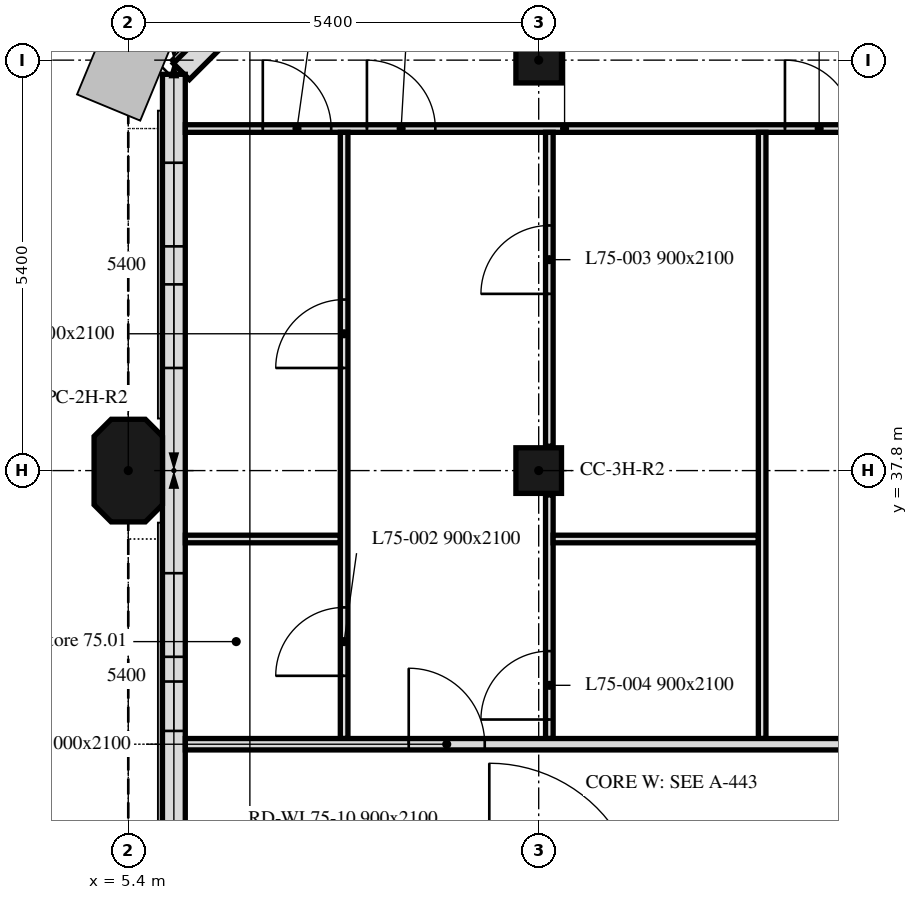
"""IFC4 building model, lengths in metres.
Left out: names, types, materials, properties, quantities, classifications, styles, units other than length and angle.
Written with IfcOpenShell. Run it as: python <this file> out.ifc"""

import sys

from ifc_helpers import new_model, si_unit, direction, frame, frame_2d, origin, origin_2d, place, context, subcontext, project, spatial, polyline, rectangle, outline, extrude, element, fill, save


model = new_model("IFC4")
c1 = context("Model", 3, precision=1e-05, world=origin(), true_north=direction((0.0, 1.0)))
c2 = subcontext(c1, "Body", "Model", "MODEL_VIEW")
j1 = project(units=[si_unit("LENGTHUNIT", "METRE"), si_unit("PLANEANGLEUNIT", "RADIAN")], contexts=[c1])
p1 = place(None, origin())
s1 = spatial("IfcSite", under=j1, at=p1, CompositionType="ELEMENT")
p2 = place(p1, origin())
s2 = spatial("IfcBuilding", under=s1, at=p2, CompositionType="ELEMENT")
p3 = place(p2, frame((0.0, 0.0, 301.6)))
s3 = spatial("IfcBuildingStorey", under=s2, at=p3, CompositionType="ELEMENT", Elevation=301.6)
p4 = place(p3, frame((5.4, 37.8, 0.0), z_axis=(0.0, 0.0, 1.0), x_axis=(0.0, 1.0, 0.0)))
e1 = element("IfcColumn", 1, at=p4, inside=s3, PredefinedType="COLUMN", context=c2, shape_type="SweptSolid", body=[
    extrude(outline(polyline([(-0.45, -0.45), (0.45, -0.45), (0.675, -0.225), (0.675, 0.225), (0.45, 0.45), (-0.45, 0.45), (-0.675, 0.225), (-0.675, -0.225), (-0.45, -0.45)])), origin(), (0.0, 0.0, 1.0), 3.0),
])
for number, where, z_axis, x_axis in (
    (2, (10.8, 37.8, 0.0), (0.0, 0.0, 1.0), (1.0, 0.0, 0.0)),
    (3, (10.8, 43.2, 0.0), (0.0, 0.0, 1.0), (1.0, 0.0, 0.0)),
):
    element("IfcColumn", number, at=place(p3, frame(where, z_axis=z_axis, x_axis=x_axis)), inside=s3, PredefinedType="COLUMN", context=c2, shape_type="SweptSolid", body=[
        extrude(rectangle(XDim=0.6, YDim=0.6, at=origin_2d()), origin(), (0.0, 0.0, 1.0), 3.0),
    ])
p5 = place(p3, frame((10.949, 47.901, 0.0), z_axis=(0.0, 0.0, 1.0), x_axis=(-0.707106781187, -0.707106781187, 0.0)))
e4 = element("IfcWall", 4, at=p5, inside=s3, PredefinedType="SOLIDWALL", context=c2, shape_type="SweptSolid", body=[
    extrude(rectangle(XDim=6.86, YDim=0.3, at=frame_2d((3.43, 0.0))), origin(), (0.0, 0.0, 1.0), 3.0),
])
p6 = place(p5, frame((1.73, 0.0, 0.9)))
e5 = element("IfcOpeningElement", 5, at=p6, cuts=e4, PredefinedType="OPENING", context=c2, shape_type="SweptSolid", body=[
    extrude(rectangle(XDim=3.4, YDim=1.7, at=frame_2d((1.7, 0.85))), frame((0.0, 0.16, 0.0), z_axis=(0.0, -1.0, 0.0), x_axis=(1.0, 0.0, 0.0)), (0.0, 0.0, 1.0), 0.32),
])
p7 = place(p3, frame((6.0, 43.014, 0.0), z_axis=(0.0, 0.0, 1.0), x_axis=(0.0, -1.0, 0.0)))
e6 = element("IfcWall", 6, at=p7, inside=s3, PredefinedType="SOLIDWALL", context=c2, shape_type="SweptSolid", body=[
    extrude(rectangle(XDim=10.614, YDim=0.3, at=frame_2d((5.307, 0.0))), origin(), (0.0, 0.0, 1.0), 3.0),
])
p8 = place(p7, frame((1.164, 0.0, 0.9)))
e7 = element("IfcOpeningElement", 7, at=p8, cuts=e6, PredefinedType="OPENING", context=c2, shape_type="SweptSolid", body=[
    extrude(rectangle(XDim=1.1, YDim=1.7, at=frame_2d((0.55, 0.85))), frame((0.0, 0.16, 0.0), z_axis=(0.0, -1.0, 0.0), x_axis=(1.0, 0.0, 0.0)), (0.0, 0.0, 1.0), 0.32),
])
p9 = place(p7, frame((2.764, 0.0, 0.9)))
e8 = element("IfcOpeningElement", 8, at=p9, cuts=e6, PredefinedType="OPENING", context=c2, shape_type="SweptSolid", body=[
    extrude(rectangle(XDim=1.1, YDim=1.7, at=frame_2d((0.55, 0.85))), frame((0.0, 0.16, 0.0), z_axis=(0.0, -1.0, 0.0), x_axis=(1.0, 0.0, 0.0)), (0.0, 0.0, 1.0), 0.32),
])
p10 = place(p7, frame((6.564, 0.0, 0.9)))
e9 = element("IfcOpeningElement", 9, at=p10, cuts=e6, PredefinedType="OPENING", context=c2, shape_type="SweptSolid", body=[
    extrude(rectangle(XDim=1.1, YDim=1.7, at=frame_2d((0.55, 0.85))), frame((0.0, 0.16, 0.0), z_axis=(0.0, -1.0, 0.0), x_axis=(1.0, 0.0, 0.0)), (0.0, 0.0, 1.0), 0.32),
])
p11 = place(p7, frame((7.989, 0.0, 0.9)))
e10 = element("IfcOpeningElement", 10, at=p11, cuts=e6, PredefinedType="OPENING", context=c2, shape_type="SweptSolid", body=[
    extrude(rectangle(XDim=0.65, YDim=1.7, at=frame_2d((0.325, 0.85))), frame((0.0, 0.16, 0.0), z_axis=(0.0, -1.0, 0.0), x_axis=(1.0, 0.0, 0.0)), (0.0, 0.0, 1.0), 0.32),
])
p12 = place(p3, frame((6.151, 42.3, 0.0), z_axis=(0.0, 0.0, 1.0), x_axis=(1.0, 0.0, 0.0)))
e11 = element("IfcWall", 11, at=p12, inside=s3, PredefinedType="PARTITIONING", context=c2, shape_type="SweptSolid", body=[
    extrude(rectangle(XDim=9.979, YDim=0.1, at=frame_2d((4.99, 0.0))), origin(), (0.0, 0.0, 1.0), 3.0),
])
p13 = place(p12, frame((7.889, 0.0, 0.0)))
e12 = element("IfcOpeningElement", 12, at=p13, cuts=e11, PredefinedType="OPENING", context=c2, shape_type="SweptSolid", body=[
    extrude(rectangle(XDim=0.9, YDim=2.1, at=frame_2d((0.45, 1.05))), frame((0.0, 0.05, 0.0), z_axis=(0.0, -1.0, 0.0), x_axis=(1.0, 0.0, 0.0)), (0.0, 0.0, 1.0), 0.1),
])
p14 = place(p12, frame((1.019, 0.0, 0.0)))
e13 = element("IfcOpeningElement", 13, at=p14, cuts=e11, PredefinedType="OPENING", context=c2, shape_type="SweptSolid", body=[
    extrude(rectangle(XDim=0.9, YDim=2.1, at=frame_2d((0.45, 1.05))), frame((0.0, 0.05, 0.0), z_axis=(0.0, -1.0, 0.0), x_axis=(1.0, 0.0, 0.0)), (0.0, 0.0, 1.0), 0.1),
])
p15 = place(p12, frame((2.389, 0.0, 0.0)))
e14 = element("IfcOpeningElement", 14, at=p15, cuts=e11, PredefinedType="OPENING", context=c2, shape_type="SweptSolid", body=[
    extrude(rectangle(XDim=0.9, YDim=2.1, at=frame_2d((0.45, 1.05))), frame((0.0, 0.05, 0.0), z_axis=(0.0, -1.0, 0.0), x_axis=(1.0, 0.0, 0.0)), (0.0, 0.0, 1.0), 0.1),
])
p16 = place(p3, frame((6.151, 36.9, 0.0), z_axis=(0.0, 0.0, 1.0), x_axis=(1.0, 0.0, 0.0)))
e15 = element("IfcWall", 15, at=p16, inside=s3, PredefinedType="PARTITIONING", context=c2, shape_type="SweptSolid", body=[
    extrude(rectangle(XDim=2.039, YDim=0.1, at=frame_2d((1.02, 0.0))), origin(), (0.0, 0.0, 1.0), 3.0),
])
p17 = place(p3, frame((8.24, 34.275, 0.0), z_axis=(0.0, 0.0, 1.0), x_axis=(0.0, 1.0, 0.0)))
e16 = element("IfcWall", 16, at=p17, inside=s3, PredefinedType="PARTITIONING", context=c2, shape_type="SweptSolid", body=[
    extrude(rectangle(XDim=7.975, YDim=0.1, at=frame_2d((3.988, 0.0))), origin(), (0.0, 0.0, 1.0), 3.0),
])
p18 = place(p17, frame((0.825, 0.0, 0.0)))
e17 = element("IfcOpeningElement", 17, at=p18, cuts=e16, PredefinedType="OPENING", context=c2, shape_type="SweptSolid", body=[
    extrude(rectangle(XDim=0.9, YDim=2.1, at=frame_2d((0.45, 1.05))), frame((0.0, 0.05, 0.0), z_axis=(0.0, -1.0, 0.0), x_axis=(1.0, 0.0, 0.0)), (0.0, 0.0, 1.0), 0.1),
])
p19 = place(p17, frame((4.875, 0.0, 0.0)))
e18 = element("IfcOpeningElement", 18, at=p19, cuts=e16, PredefinedType="OPENING", context=c2, shape_type="SweptSolid", body=[
    extrude(rectangle(XDim=0.9, YDim=2.1, at=frame_2d((0.45, 1.05))), frame((0.0, 0.05, 0.0), z_axis=(0.0, -1.0, 0.0), x_axis=(1.0, 0.0, 0.0)), (0.0, 0.0, 1.0), 0.1),
])
p20 = place(p3, frame((10.94, 34.275, 0.0), z_axis=(0.0, 0.0, 1.0), x_axis=(0.0, 1.0, 0.0)))
e19 = element("IfcWall", 19, at=p20, inside=s3, PredefinedType="PARTITIONING", context=c2, shape_type="SweptSolid", body=[
    extrude(rectangle(XDim=3.205, YDim=0.1, at=frame_2d((1.603, 0.0))), origin(), (0.0, 0.0, 1.0), 3.0),
])
p21 = place(p20, frame((0.25, 0.0, 0.0)))
e20 = element("IfcOpeningElement", 20, at=p21, cuts=e19, PredefinedType="OPENING", context=c2, shape_type="SweptSolid", body=[
    extrude(rectangle(XDim=0.9, YDim=2.1, at=frame_2d((0.45, 1.05))), frame((0.0, 0.05, 0.0), z_axis=(0.0, -1.0, 0.0), x_axis=(1.0, 0.0, 0.0)), (0.0, 0.0, 1.0), 0.1),
])
p22 = place(p3, frame((10.94, 38.12, 0.0), z_axis=(0.0, 0.0, 1.0), x_axis=(0.0, 1.0, 0.0)))
e21 = element("IfcWall", 21, at=p22, inside=s3, PredefinedType="PARTITIONING", context=c2, shape_type="SweptSolid", body=[
    extrude(rectangle(XDim=4.13, YDim=0.1, at=frame_2d((2.065, 0.0))), origin(), (0.0, 0.0, 1.0), 3.0),
])
p23 = place(p22, frame((2.005, 0.0, 0.0)))
e22 = element("IfcOpeningElement", 22, at=p23, cuts=e21, PredefinedType="OPENING", context=c2, shape_type="SweptSolid", body=[
    extrude(rectangle(XDim=0.9, YDim=2.1, at=frame_2d((0.45, 1.05))), frame((0.0, 0.05, 0.0), z_axis=(0.0, -1.0, 0.0), x_axis=(1.0, 0.0, 0.0)), (0.0, 0.0, 1.0), 0.1),
])
p24 = place(p3, frame((10.99, 36.9, 0.0), z_axis=(0.0, 0.0, 1.0), x_axis=(1.0, 0.0, 0.0)))
e23 = element("IfcWall", 23, at=p24, inside=s3, PredefinedType="PARTITIONING", context=c2, shape_type="SweptSolid", body=[
    extrude(rectangle(XDim=2.7, YDim=0.1, at=frame_2d((1.35, 0.0))), origin(), (0.0, 0.0, 1.0), 3.0),
])
p25 = place(p3, frame((13.74, 34.275, 0.0), z_axis=(0.0, 0.0, 1.0), x_axis=(0.0, 1.0, 0.0)))
e24 = element("IfcWall", 24, at=p25, inside=s3, PredefinedType="PARTITIONING", context=c2, shape_type="SweptSolid", body=[
    extrude(rectangle(XDim=7.975, YDim=0.1, at=frame_2d((3.988, 0.0))), origin(), (0.0, 0.0, 1.0), 3.0),
])
p26 = place(p3, frame((6.151, 34.2, 0.0), z_axis=(0.0, 0.0, 1.0), x_axis=(1.0, 0.0, 0.0)))
e25 = element("IfcWall", 25, at=p26, inside=s3, PredefinedType="PARTITIONING", context=c2, shape_type="SweptSolid", body=[
    extrude(rectangle(XDim=41.698, YDim=0.15, at=frame_2d((20.849, 0.0))), origin(), (0.0, 0.0, 1.0), 2.4),
])
p27 = place(p26, frame((2.939, 0.0, 0.0)))
e26 = element("IfcOpeningElement", 26, at=p27, cuts=e25, PredefinedType="OPENING", context=c2, shape_type="SweptSolid", body=[
    extrude(rectangle(XDim=1.0, YDim=2.1, at=frame_2d((0.5, 1.05))), frame((0.0, 0.075, 0.0), z_axis=(0.0, -1.0, 0.0), x_axis=(1.0, 0.0, 0.0)), (0.0, 0.0, 1.0), 0.15),
])
p28 = place(p26, frame((18.121, 0.0, 0.0)))
e27 = element("IfcOpeningElement", 27, at=p28, cuts=e25, PredefinedType="OPENING", context=c2, shape_type="SweptSolid", body=[
    extrude(rectangle(XDim=1.0, YDim=2.1, at=frame_2d((0.5, 1.05))), frame((0.0, 0.075, 0.0), z_axis=(0.0, -1.0, 0.0), x_axis=(1.0, 0.0, 0.0)), (0.0, 0.0, 1.0), 0.15),
])
p29 = place(p26, frame((32.359, 0.0, 0.0)))
e28 = element("IfcOpeningElement", 28, at=p29, cuts=e25, PredefinedType="OPENING", context=c2, shape_type="SweptSolid", body=[
    extrude(rectangle(XDim=1.0, YDim=2.1, at=frame_2d((0.5, 1.05))), frame((0.0, 0.075, 0.0), z_axis=(0.0, -1.0, 0.0), x_axis=(1.0, 0.0, 0.0)), (0.0, 0.0, 1.0), 0.15),
])
p30 = place(p8, origin())
e29 = element("IfcWindow", 29, at=p30, inside=s3, PartitioningType="SINGLE_PANEL", PredefinedType="WINDOW", context=c2, shape_type="SweptSolid", body=[
    extrude(rectangle(XDim=1.1, YDim=1.7, at=frame_2d((0.55, 0.85))), frame((0.0, 0.03, 0.0), z_axis=(0.0, -1.0, 0.0), x_axis=(1.0, 0.0, 0.0)), (0.0, 0.0, 1.0), 0.06),
])
fill(e7, e29)
p31 = place(p9, origin())
e30 = element("IfcWindow", 30, at=p31, inside=s3, PartitioningType="SINGLE_PANEL", PredefinedType="WINDOW", context=c2, shape_type="SweptSolid", body=[
    extrude(rectangle(XDim=1.1, YDim=1.7, at=frame_2d((0.55, 0.85))), frame((0.0, 0.03, 0.0), z_axis=(0.0, -1.0, 0.0), x_axis=(1.0, 0.0, 0.0)), (0.0, 0.0, 1.0), 0.06),
])
fill(e8, e30)
p32 = place(p10, origin())
e31 = element("IfcWindow", 31, at=p32, inside=s3, PartitioningType="SINGLE_PANEL", PredefinedType="WINDOW", context=c2, shape_type="SweptSolid", body=[
    extrude(rectangle(XDim=1.1, YDim=1.7, at=frame_2d((0.55, 0.85))), frame((0.0, 0.03, 0.0), z_axis=(0.0, -1.0, 0.0), x_axis=(1.0, 0.0, 0.0)), (0.0, 0.0, 1.0), 0.06),
])
fill(e9, e31)
p33 = place(p11, origin())
e32 = element("IfcWindow", 32, at=p33, inside=s3, PartitioningType="SINGLE_PANEL", PredefinedType="WINDOW", context=c2, shape_type="SweptSolid", body=[
    extrude(rectangle(XDim=0.65, YDim=1.7, at=frame_2d((0.325, 0.85))), frame((0.0, 0.03, 0.0), z_axis=(0.0, -1.0, 0.0), x_axis=(1.0, 0.0, 0.0)), (0.0, 0.0, 1.0), 0.06),
])
fill(e10, e32)
p34 = place(p13, origin())
e33 = element("IfcDoor", 33, at=p34, inside=s3, OperationType="SINGLE_SWING_RIGHT", PredefinedType="DOOR", context=c2, shape_type="SweptSolid", body=[
    extrude(rectangle(XDim=0.9, YDim=2.1, at=frame_2d((0.45, 1.05))), frame((0.0, 0.025, 0.0), z_axis=(0.0, -1.0, 0.0), x_axis=(1.0, 0.0, 0.0)), (0.0, 0.0, 1.0), 0.05),
])
fill(e12, e33)
p35 = place(p18, origin())
e34 = element("IfcDoor", 34, at=p35, inside=s3, OperationType="SINGLE_SWING_LEFT", PredefinedType="DOOR", context=c2, shape_type="SweptSolid", body=[
    extrude(rectangle(XDim=0.9, YDim=2.1, at=frame_2d((0.45, 1.05))), frame((0.0, 0.025, 0.0), z_axis=(0.0, -1.0, 0.0), x_axis=(1.0, 0.0, 0.0)), (0.0, 0.0, 1.0), 0.05),
])
fill(e17, e34)
p36 = place(p23, origin())
e35 = element("IfcDoor", 35, at=p36, inside=s3, OperationType="SINGLE_SWING_RIGHT", PredefinedType="DOOR", context=c2, shape_type="SweptSolid", body=[
    extrude(rectangle(XDim=0.9, YDim=2.1, at=frame_2d((0.45, 1.05))), frame((0.0, 0.025, 0.0), z_axis=(0.0, -1.0, 0.0), x_axis=(1.0, 0.0, 0.0)), (0.0, 0.0, 1.0), 0.05),
])
fill(e22, e35)
p37 = place(p21, origin())
e36 = element("IfcDoor", 36, at=p37, inside=s3, OperationType="SINGLE_SWING_RIGHT", PredefinedType="DOOR", context=c2, shape_type="SweptSolid", body=[
    extrude(rectangle(XDim=0.9, YDim=2.1, at=frame_2d((0.45, 1.05))), frame((0.0, 0.025, 0.0), z_axis=(0.0, -1.0, 0.0), x_axis=(1.0, 0.0, 0.0)), (0.0, 0.0, 1.0), 0.05),
])
fill(e20, e36)
p38 = place(p14, origin())
e37 = element("IfcDoor", 37, at=p38, inside=s3, OperationType="SINGLE_SWING_LEFT", PredefinedType="DOOR", context=c2, shape_type="SweptSolid", body=[
    extrude(rectangle(XDim=0.9, YDim=2.1, at=frame_2d((0.45, 1.05))), frame((0.0, 0.025, 0.0), z_axis=(0.0, -1.0, 0.0), x_axis=(1.0, 0.0, 0.0)), (0.0, 0.0, 1.0), 0.05),
])
fill(e13, e37)
p39 = place(p19, origin())
e38 = element("IfcDoor", 38, at=p39, inside=s3, OperationType="SINGLE_SWING_RIGHT", PredefinedType="DOOR", context=c2, shape_type="SweptSolid", body=[
    extrude(rectangle(XDim=0.9, YDim=2.1, at=frame_2d((0.45, 1.05))), frame((0.0, 0.025, 0.0), z_axis=(0.0, -1.0, 0.0), x_axis=(1.0, 0.0, 0.0)), (0.0, 0.0, 1.0), 0.05),
])
fill(e18, e38)
p40 = place(p15, origin())
e39 = element("IfcDoor", 39, at=p40, inside=s3, OperationType="SINGLE_SWING_RIGHT", PredefinedType="DOOR", context=c2, shape_type="SweptSolid", body=[
    extrude(rectangle(XDim=0.9, YDim=2.1, at=frame_2d((0.45, 1.05))), frame((0.0, 0.025, 0.0), z_axis=(0.0, -1.0, 0.0), x_axis=(1.0, 0.0, 0.0)), (0.0, 0.0, 1.0), 0.05),
])
fill(e14, e39)
p41 = place(p27, origin())
e40 = element("IfcDoor", 40, at=p41, inside=s3, OperationType="SINGLE_SWING_LEFT", PredefinedType="DOOR", context=c2, shape_type="SweptSolid", body=[
    extrude(rectangle(XDim=1.0, YDim=2.1, at=frame_2d((0.5, 1.05))), frame((0.0, 0.025, 0.0), z_axis=(0.0, -1.0, 0.0), x_axis=(1.0, 0.0, 0.0)), (0.0, 0.0, 1.0), 0.05),
])
fill(e26, e40)
save(model, sys.argv[1])
